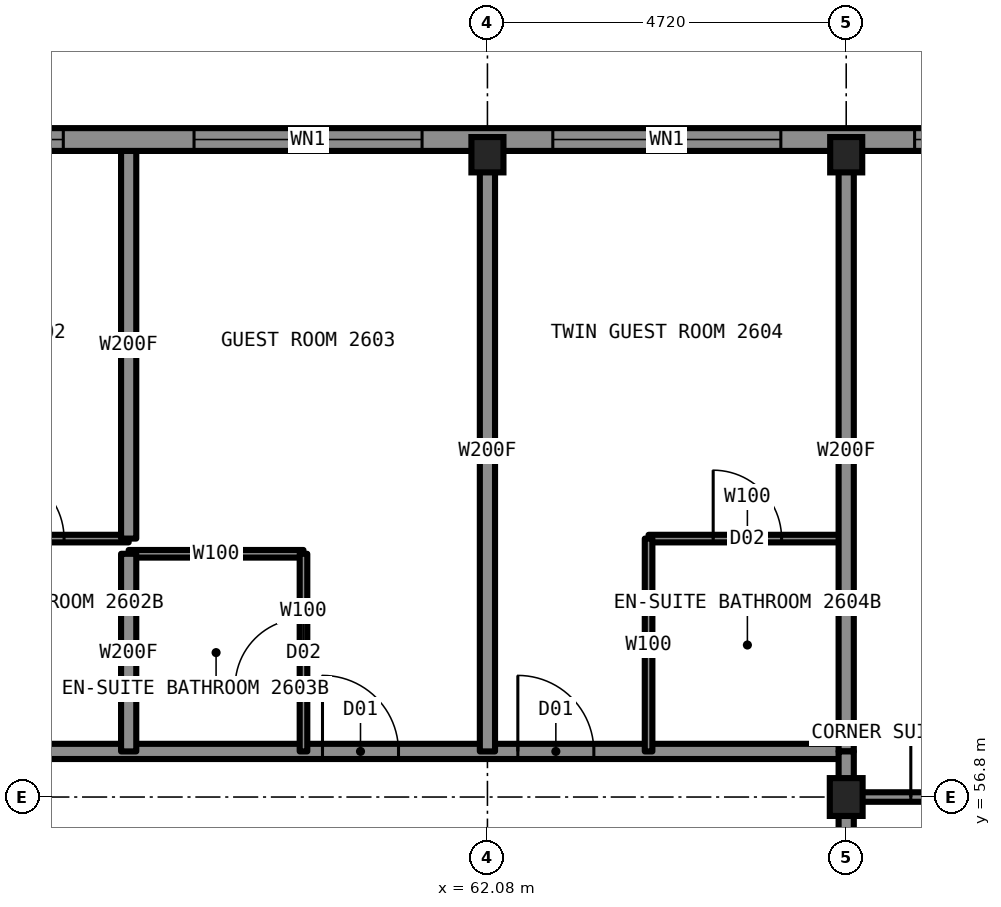
"""IFC4 building model, lengths in metres.
Left out: names, types, materials, properties, quantities, classifications, styles, units other than length and angle.
Written with IfcOpenShell. Run it as: python <this file> out.ifc"""

import sys

from ifc_helpers import new_model, si_unit, direction, frame, frame_2d, origin, origin_2d, place, context, subcontext, project, spatial, rectangle, i_section, extrude, element, fill, save


model = new_model("IFC4")
c1 = context("Model", 3, precision=1e-05, world=origin(), true_north=direction((0.0, 1.0)))
c2 = subcontext(c1, "Body", "Model", "MODEL_VIEW")
j1 = project(units=[si_unit("LENGTHUNIT", "METRE"), si_unit("PLANEANGLEUNIT", "RADIAN")], contexts=[c1])
p1 = place(None, origin())
s1 = spatial("IfcSite", under=j1, at=p1, CompositionType="ELEMENT")
p2 = place(p1, origin())
s2 = spatial("IfcBuilding", under=s1, at=p2, CompositionType="ELEMENT")
p3 = place(p2, frame((0.0, 0.0, 93.4)))
s3 = spatial("IfcBuildingStorey", under=s2, at=p3, CompositionType="ELEMENT", Elevation=93.4)
for number, where, z_axis, x_axis in (
    (1, (62.08, 65.25, 0.0), (0.0, 0.0, 1.0), (1.0, 0.0, 0.0)),
    (2, (66.8, 65.25, 0.0), (0.0, 0.0, 1.0), (1.0, 0.0, 0.0)),
):
    element("IfcColumn", number, at=place(p3, frame(where, z_axis=z_axis, x_axis=x_axis)), inside=s3, PredefinedType="COLUMN", context=c2, shape_type="SweptSolid", body=[
        extrude(i_section(OverallWidth=0.442, OverallDepth=0.531, WebThickness=0.066, FlangeThickness=0.106, at=origin_2d()), origin(), (0.0, 0.0, 1.0), 3.5),
    ])
p4 = place(p3, frame((66.8, 56.8, 0.0), z_axis=(0.0, 0.0, 1.0), x_axis=(1.0, 0.0, 0.0)))
e3 = element("IfcColumn", 3, at=p4, inside=s3, PredefinedType="COLUMN", context=c2, shape_type="SweptSolid", body=[
    extrude(i_section(OverallWidth=0.432, OverallDepth=0.498, WebThickness=0.056, FlangeThickness=0.089, at=origin_2d()), origin(), (0.0, 0.0, 1.0), 3.5),
])
p5 = place(p3, frame((66.8, 56.8, 0.0), z_axis=(0.0, 0.0, 1.0), x_axis=(1.0, 0.0, 0.0)))
e4 = element("IfcWall", 4, at=p5, inside=s3, PredefinedType="PARTITIONING", context=c2, shape_type="SweptSolid", body=[
    extrude(rectangle(XDim=8.5, YDim=0.125, at=frame_2d((4.25, 0.0))), origin(), (0.0, 0.0, 1.0), 2.573),
])
p6 = place(p5, frame((0.85, 0.0, 0.0)))
e5 = element("IfcOpeningElement", 5, at=p6, cuts=e4, PredefinedType="OPENING", context=c2, shape_type="SweptSolid", body=[
    extrude(rectangle(XDim=0.9, YDim=2.2, at=frame_2d((0.45, 1.1))), frame((0.0, 0.073, 0.0), z_axis=(0.0, -1.0, 0.0), x_axis=(1.0, 0.0, 0.0)), (0.0, 0.0, 1.0), 0.145),
])
p7 = place(p3, frame((43.2, 57.4, 0.0), z_axis=(0.0, 0.0, 1.0), x_axis=(1.0, 0.0, 0.0)))
e6 = element("IfcWall", 6, at=p7, inside=s3, PredefinedType="PARTITIONING", context=c2, shape_type="SweptSolid", body=[
    extrude(rectangle(XDim=23.6, YDim=0.2, at=frame_2d((11.8, 0.0))), origin(), (0.0, 0.0, 1.0), 3.33),
])
p8 = place(p7, frame((3.0, 0.0, 0.0)))
e7 = element("IfcOpeningElement", 7, at=p8, cuts=e6, PredefinedType="OPENING", context=c2, shape_type="SweptSolid", body=[
    extrude(rectangle(XDim=1.0, YDim=2.2, at=frame_2d((0.5, 1.1))), frame((0.0, 0.11, 0.0), z_axis=(0.0, -1.0, 0.0), x_axis=(1.0, 0.0, 0.0)), (0.0, 0.0, 1.0), 0.22),
])
p9 = place(p7, frame((9.84, 0.0, 0.0)))
e8 = element("IfcOpeningElement", 8, at=p9, cuts=e6, PredefinedType="OPENING", context=c2, shape_type="SweptSolid", body=[
    extrude(rectangle(XDim=1.0, YDim=2.2, at=frame_2d((0.5, 1.1))), frame((0.0, 0.11, 0.0), z_axis=(0.0, -1.0, 0.0), x_axis=(1.0, 0.0, 0.0)), (0.0, 0.0, 1.0), 0.22),
])
p10 = place(p7, frame((16.71, 0.0, 0.0)))
e9 = element("IfcOpeningElement", 9, at=p10, cuts=e6, PredefinedType="OPENING", context=c2, shape_type="SweptSolid", body=[
    extrude(rectangle(XDim=1.0, YDim=2.2, at=frame_2d((0.5, 1.1))), frame((0.0, 0.11, 0.0), z_axis=(0.0, -1.0, 0.0), x_axis=(1.0, 0.0, 0.0)), (0.0, 0.0, 1.0), 0.22),
])
p11 = place(p7, frame((19.28, 0.0, 0.0)))
e10 = element("IfcOpeningElement", 10, at=p11, cuts=e6, PredefinedType="OPENING", context=c2, shape_type="SweptSolid", body=[
    extrude(rectangle(XDim=1.0, YDim=2.2, at=frame_2d((0.5, 1.1))), frame((0.0, 0.11, 0.0), z_axis=(0.0, -1.0, 0.0), x_axis=(1.0, 0.0, 0.0)), (0.0, 0.0, 1.0), 0.22),
])
p12 = place(p3, frame((57.36, 60.0, 0.0), z_axis=(0.0, 0.0, 1.0), x_axis=(1.0, 0.0, 0.0)))
e11 = element("IfcWall", 11, at=p12, inside=s3, PredefinedType="PARTITIONING", context=c2, shape_type="SweptSolid", body=[
    extrude(rectangle(XDim=2.3, YDim=0.1, at=frame_2d((1.15, 0.0))), origin(), (0.0, 0.0, 1.0), 2.731),
])
p13 = place(p3, frame((54.76, 60.2, 0.0), z_axis=(0.0, 0.0, 1.0), x_axis=(1.0, 0.0, 0.0)))
e12 = element("IfcWall", 12, at=p13, inside=s3, PredefinedType="PARTITIONING", context=c2, shape_type="SweptSolid", body=[
    extrude(rectangle(XDim=2.6, YDim=0.1, at=frame_2d((1.3, 0.0))), origin(), (0.0, 0.0, 1.0), 2.731),
])
p14 = place(p13, frame((0.85, 0.0, 0.0)))
e13 = element("IfcOpeningElement", 13, at=p14, cuts=e12, PredefinedType="OPENING", context=c2, shape_type="SweptSolid", body=[
    extrude(rectangle(XDim=0.9, YDim=2.1, at=frame_2d((0.45, 1.05))), frame((0.0, 0.06, 0.0), z_axis=(0.0, -1.0, 0.0), x_axis=(1.0, 0.0, 0.0)), (0.0, 0.0, 1.0), 0.12),
])
p15 = place(p3, frame((64.2, 60.2, 0.0), z_axis=(0.0, 0.0, 1.0), x_axis=(1.0, 0.0, 0.0)))
e14 = element("IfcWall", 14, at=p15, inside=s3, PredefinedType="PARTITIONING", context=c2, shape_type="SweptSolid", body=[
    extrude(rectangle(XDim=2.6, YDim=0.1, at=frame_2d((1.3, 0.0))), origin(), (0.0, 0.0, 1.0), 2.731),
])
p16 = place(p15, frame((0.85, 0.0, 0.0)))
e15 = element("IfcOpeningElement", 15, at=p16, cuts=e14, PredefinedType="OPENING", context=c2, shape_type="SweptSolid", body=[
    extrude(rectangle(XDim=0.9, YDim=2.1, at=frame_2d((0.45, 1.05))), frame((0.0, 0.06, 0.0), z_axis=(0.0, -1.0, 0.0), x_axis=(1.0, 0.0, 0.0)), (0.0, 0.0, 1.0), 0.12),
])
p17 = place(p3, frame((66.8, 33.22, 0.0), z_axis=(0.0, 0.0, 1.0), x_axis=(0.0, 1.0, 0.0)))
e16 = element("IfcWall", 16, at=p17, inside=s3, PredefinedType="PARTITIONING", context=c2, shape_type="SweptSolid", body=[
    extrude(rectangle(XDim=23.56, YDim=0.2, at=frame_2d((11.78, 0.0))), origin(), (0.0, 0.0, 1.0), 3.33),
])
p18 = place(p17, frame((6.16, 0.0, 0.0)))
e17 = element("IfcOpeningElement", 17, at=p18, cuts=e16, PredefinedType="OPENING", context=c2, shape_type="SweptSolid", body=[
    extrude(rectangle(XDim=1.0, YDim=2.2, at=frame_2d((0.5, 1.1))), frame((0.0, 0.11, 0.0), z_axis=(0.0, -1.0, 0.0), x_axis=(1.0, 0.0, 0.0)), (0.0, 0.0, 1.0), 0.22),
])
p19 = place(p17, frame((12.42, 0.0, 0.0)))
e18 = element("IfcOpeningElement", 18, at=p19, cuts=e16, PredefinedType="OPENING", context=c2, shape_type="SweptSolid", body=[
    extrude(rectangle(XDim=1.0, YDim=2.2, at=frame_2d((0.5, 1.1))), frame((0.0, 0.11, 0.0), z_axis=(0.0, -1.0, 0.0), x_axis=(1.0, 0.0, 0.0)), (0.0, 0.0, 1.0), 0.22),
])
p20 = place(p17, frame((21.82, 0.0, 0.0)))
e19 = element("IfcOpeningElement", 19, at=p20, cuts=e16, PredefinedType="OPENING", context=c2, shape_type="SweptSolid", body=[
    extrude(rectangle(XDim=1.1, YDim=2.2, at=frame_2d((0.55, 1.1))), frame((0.0, 0.11, 0.0), z_axis=(0.0, -1.0, 0.0), x_axis=(1.0, 0.0, 0.0)), (0.0, 0.0, 1.0), 0.22),
])
p21 = place(p17, frame((0.64, 0.0, 0.0)))
e20 = element("IfcOpeningElement", 20, at=p21, cuts=e16, PredefinedType="OPENING", context=c2, shape_type="SweptSolid", body=[
    extrude(rectangle(XDim=1.1, YDim=2.2, at=frame_2d((0.55, 1.1))), frame((0.0, 0.11, 0.0), z_axis=(0.0, -1.0, 0.0), x_axis=(1.0, 0.0, 0.0)), (0.0, 0.0, 1.0), 0.22),
])
p22 = place(p3, frame((66.8, 57.4, 0.0), z_axis=(0.0, 0.0, 1.0), x_axis=(0.0, 1.0, 0.0)))
e21 = element("IfcWall", 21, at=p22, inside=s3, PredefinedType="PARTITIONING", context=c2, shape_type="SweptSolid", body=[
    extrude(rectangle(XDim=7.9, YDim=0.2, at=frame_2d((3.95, 0.0))), origin(), (0.0, 0.0, 1.0), 2.573),
])
p23 = place(p3, frame((57.36, 57.4, 0.0), z_axis=(0.0, 0.0, 1.0), x_axis=(0.0, 1.0, 0.0)))
e22 = element("IfcWall", 22, at=p23, inside=s3, PredefinedType="PARTITIONING", context=c2, shape_type="SweptSolid", body=[
    extrude(rectangle(XDim=2.6, YDim=0.2, at=frame_2d((1.3, 0.0))), origin(), (0.0, 0.0, 1.0), 3.33),
])
p24 = place(p3, frame((57.36, 60.2, 0.0), z_axis=(0.0, 0.0, 1.0), x_axis=(0.0, 1.0, 0.0)))
e23 = element("IfcWall", 23, at=p24, inside=s3, PredefinedType="PARTITIONING", context=c2, shape_type="SweptSolid", body=[
    extrude(rectangle(XDim=5.1, YDim=0.2, at=frame_2d((2.55, 0.0))), origin(), (0.0, 0.0, 1.0), 3.33),
])
p25 = place(p3, frame((59.66, 57.4, 0.0), z_axis=(0.0, 0.0, 1.0), x_axis=(0.0, 1.0, 0.0)))
e24 = element("IfcWall", 24, at=p25, inside=s3, PredefinedType="PARTITIONING", context=c2, shape_type="SweptSolid", body=[
    extrude(rectangle(XDim=2.6, YDim=0.1, at=frame_2d((1.3, 0.0))), origin(), (0.0, 0.0, 1.0), 3.33),
])
p26 = place(p25, frame((0.85, 0.0, 0.0)))
e25 = element("IfcOpeningElement", 25, at=p26, cuts=e24, PredefinedType="OPENING", context=c2, shape_type="SweptSolid", body=[
    extrude(rectangle(XDim=0.9, YDim=2.1, at=frame_2d((0.45, 1.05))), frame((0.0, 0.06, 0.0), z_axis=(0.0, -1.0, 0.0), x_axis=(1.0, 0.0, 0.0)), (0.0, 0.0, 1.0), 0.12),
])
p27 = place(p3, frame((62.08, 57.4, 0.0), z_axis=(0.0, 0.0, 1.0), x_axis=(0.0, 1.0, 0.0)))
e26 = element("IfcWall", 26, at=p27, inside=s3, PredefinedType="PARTITIONING", context=c2, shape_type="SweptSolid", body=[
    extrude(rectangle(XDim=7.9, YDim=0.2, at=frame_2d((3.95, 0.0))), origin(), (0.0, 0.0, 1.0), 2.573),
])
p28 = place(p3, frame((64.2, 57.4, 0.0), z_axis=(0.0, 0.0, 1.0), x_axis=(0.0, 1.0, 0.0)))
e27 = element("IfcWall", 27, at=p28, inside=s3, PredefinedType="PARTITIONING", context=c2, shape_type="SweptSolid", body=[
    extrude(rectangle(XDim=2.8, YDim=0.1, at=frame_2d((1.4, 0.0))), origin(), (0.0, 0.0, 1.0), 3.33),
])
p29 = place(p3, frame((70.1, 65.45, 0.0), z_axis=(0.0, 0.0, 1.0), x_axis=(-1.0, 0.0, 0.0)))
e28 = element("IfcWall", 28, at=p29, inside=s3, PredefinedType="SOLIDWALL", context=c2, shape_type="SweptSolid", body=[
    extrude(rectangle(XDim=30.2, YDim=0.3, at=frame_2d((15.1, 0.0))), origin(), (0.0, 0.0, 1.0), 2.83),
])
p30 = place(p29, frame((0.85, 0.0, 0.5)))
e29 = element("IfcOpeningElement", 29, at=p30, cuts=e28, PredefinedType="OPENING", context=c2, shape_type="SweptSolid", body=[
    extrude(rectangle(XDim=1.6, YDim=2.0, at=frame_2d((0.8, 1.0))), frame((0.0, 0.16, 0.0), z_axis=(0.0, -1.0, 0.0), x_axis=(1.0, 0.0, 0.0)), (0.0, 0.0, 1.0), 0.32),
])
p31 = place(p29, frame((4.16, 0.0, 0.5)))
e30 = element("IfcOpeningElement", 30, at=p31, cuts=e28, PredefinedType="OPENING", context=c2, shape_type="SweptSolid", body=[
    extrude(rectangle(XDim=3.0, YDim=2.0, at=frame_2d((1.5, 1.0))), frame((0.0, 0.16, 0.0), z_axis=(0.0, -1.0, 0.0), x_axis=(1.0, 0.0, 0.0)), (0.0, 0.0, 1.0), 0.32),
])
p32 = place(p29, frame((8.88, 0.0, 0.5)))
e31 = element("IfcOpeningElement", 31, at=p32, cuts=e28, PredefinedType="OPENING", context=c2, shape_type="SweptSolid", body=[
    extrude(rectangle(XDim=3.0, YDim=2.0, at=frame_2d((1.5, 1.0))), frame((0.0, 0.16, 0.0), z_axis=(0.0, -1.0, 0.0), x_axis=(1.0, 0.0, 0.0)), (0.0, 0.0, 1.0), 0.32),
])
p33 = place(p29, frame((13.6, 0.0, 0.5)))
e32 = element("IfcOpeningElement", 32, at=p33, cuts=e28, PredefinedType="OPENING", context=c2, shape_type="SweptSolid", body=[
    extrude(rectangle(XDim=3.0, YDim=2.0, at=frame_2d((1.5, 1.0))), frame((0.0, 0.16, 0.0), z_axis=(0.0, -1.0, 0.0), x_axis=(1.0, 0.0, 0.0)), (0.0, 0.0, 1.0), 0.32),
])
p34 = place(p29, frame((18.32, 0.0, 0.5)))
e33 = element("IfcOpeningElement", 33, at=p34, cuts=e28, PredefinedType="OPENING", context=c2, shape_type="SweptSolid", body=[
    extrude(rectangle(XDim=3.0, YDim=2.0, at=frame_2d((1.5, 1.0))), frame((0.0, 0.16, 0.0), z_axis=(0.0, -1.0, 0.0), x_axis=(1.0, 0.0, 0.0)), (0.0, 0.0, 1.0), 0.32),
])
p35 = place(p29, frame((23.04, 0.0, 0.5)))
e34 = element("IfcOpeningElement", 34, at=p35, cuts=e28, PredefinedType="OPENING", context=c2, shape_type="SweptSolid", body=[
    extrude(rectangle(XDim=3.0, YDim=2.0, at=frame_2d((1.5, 1.0))), frame((0.0, 0.16, 0.0), z_axis=(0.0, -1.0, 0.0), x_axis=(1.0, 0.0, 0.0)), (0.0, 0.0, 1.0), 0.32),
])
p36 = place(p29, frame((27.75, 0.0, 0.5)))
e35 = element("IfcOpeningElement", 35, at=p36, cuts=e28, PredefinedType="OPENING", context=c2, shape_type="SweptSolid", body=[
    extrude(rectangle(XDim=1.6, YDim=2.0, at=frame_2d((0.8, 1.0))), frame((0.0, 0.16, 0.0), z_axis=(0.0, -1.0, 0.0), x_axis=(1.0, 0.0, 0.0)), (0.0, 0.0, 1.0), 0.32),
])
p37 = place(p3, frame((66.8, 56.78, 0.0), z_axis=(0.0, 0.0, 1.0), x_axis=(0.0, 1.0, 0.0)))
e36 = element("IfcWall", 36, at=p37, inside=s3, PredefinedType="PARTITIONING", context=c2, shape_type="SweptSolid", body=[
    extrude(rectangle(XDim=0.62, YDim=0.2, at=frame_2d((0.31, 0.0))), origin(), (0.0, 0.0, 1.0), 2.573),
])
p38 = place(p14, origin())
e37 = element("IfcDoor", 37, at=p38, inside=s3, OperationType="SINGLE_SWING_RIGHT", PredefinedType="DOOR", context=c2, shape_type="SweptSolid", body=[
    extrude(rectangle(XDim=0.9, YDim=2.1, at=frame_2d((0.45, 1.05))), frame((0.0, 0.025, 0.0), z_axis=(0.0, -1.0, 0.0), x_axis=(1.0, 0.0, 0.0)), (0.0, 0.0, 1.0), 0.05),
])
fill(e13, e37)
p39 = place(p10, origin())
e38 = element("IfcDoor", 38, at=p39, inside=s3, OperationType="SINGLE_SWING_LEFT", PredefinedType="DOOR", context=c2, shape_type="SweptSolid", body=[
    extrude(rectangle(XDim=1.0, YDim=2.2, at=frame_2d((0.5, 1.1))), frame((0.0, 0.025, 0.0), z_axis=(0.0, -1.0, 0.0), x_axis=(1.0, 0.0, 0.0)), (0.0, 0.0, 1.0), 0.05),
])
fill(e9, e38)
p40 = place(p26, origin())
e39 = element("IfcDoor", 39, at=p40, inside=s3, OperationType="SINGLE_SWING_RIGHT", PredefinedType="DOOR", context=c2, shape_type="SweptSolid", body=[
    extrude(rectangle(XDim=0.9, YDim=2.1, at=frame_2d((0.45, 1.05))), frame((0.0, 0.025, 0.0), z_axis=(0.0, -1.0, 0.0), x_axis=(1.0, 0.0, 0.0)), (0.0, 0.0, 1.0), 0.05),
])
fill(e25, e39)
p41 = place(p11, origin())
e40 = element("IfcDoor", 40, at=p41, inside=s3, OperationType="SINGLE_SWING_LEFT", PredefinedType="DOOR", context=c2, shape_type="SweptSolid", body=[
    extrude(rectangle(XDim=1.0, YDim=2.2, at=frame_2d((0.5, 1.1))), frame((0.0, 0.025, 0.0), z_axis=(0.0, -1.0, 0.0), x_axis=(1.0, 0.0, 0.0)), (0.0, 0.0, 1.0), 0.05),
])
fill(e10, e40)
p42 = place(p16, origin())
e41 = element("IfcDoor", 41, at=p42, inside=s3, OperationType="SINGLE_SWING_RIGHT", PredefinedType="DOOR", context=c2, shape_type="SweptSolid", body=[
    extrude(rectangle(XDim=0.9, YDim=2.1, at=frame_2d((0.45, 1.05))), frame((0.0, 0.025, 0.0), z_axis=(0.0, -1.0, 0.0), x_axis=(1.0, 0.0, 0.0)), (0.0, 0.0, 1.0), 0.05),
])
fill(e15, e41)
p43 = place(p6, origin())
e42 = element("IfcDoor", 42, at=p43, inside=s3, OperationType="SINGLE_SWING_LEFT", PredefinedType="DOOR", context=c2, shape_type="SweptSolid", body=[
    extrude(rectangle(XDim=0.9, YDim=2.2, at=frame_2d((0.45, 1.1))), frame((0.0, 0.025, 0.0), z_axis=(0.0, -1.0, 0.0), x_axis=(1.0, 0.0, 0.0)), (0.0, 0.0, 1.0), 0.05),
])
fill(e5, e42)
p44 = place(p30, origin())
e43 = element("IfcWindow", 43, at=p44, inside=s3, PartitioningType="SINGLE_PANEL", PredefinedType="WINDOW", context=c2, shape_type="SweptSolid", body=[
    extrude(rectangle(XDim=1.6, YDim=2.0, at=frame_2d((0.8, 1.0))), frame((0.0, 0.03, 0.0), z_axis=(0.0, -1.0, 0.0), x_axis=(1.0, 0.0, 0.0)), (0.0, 0.0, 1.0), 0.06),
])
fill(e29, e43)
p45 = place(p31, origin())
e44 = element("IfcWindow", 44, at=p45, inside=s3, PartitioningType="SINGLE_PANEL", PredefinedType="WINDOW", context=c2, shape_type="SweptSolid", body=[
    extrude(rectangle(XDim=3.0, YDim=2.0, at=frame_2d((1.5, 1.0))), frame((0.0, 0.03, 0.0), z_axis=(0.0, -1.0, 0.0), x_axis=(1.0, 0.0, 0.0)), (0.0, 0.0, 1.0), 0.06),
])
fill(e30, e44)
p46 = place(p32, origin())
e45 = element("IfcWindow", 45, at=p46, inside=s3, PartitioningType="SINGLE_PANEL", PredefinedType="WINDOW", context=c2, shape_type="SweptSolid", body=[
    extrude(rectangle(XDim=3.0, YDim=2.0, at=frame_2d((1.5, 1.0))), frame((0.0, 0.03, 0.0), z_axis=(0.0, -1.0, 0.0), x_axis=(1.0, 0.0, 0.0)), (0.0, 0.0, 1.0), 0.06),
])
fill(e31, e45)
p47 = place(p33, origin())
e46 = element("IfcWindow", 46, at=p47, inside=s3, PartitioningType="SINGLE_PANEL", PredefinedType="WINDOW", context=c2, shape_type="SweptSolid", body=[
    extrude(rectangle(XDim=3.0, YDim=2.0, at=frame_2d((1.5, 1.0))), frame((0.0, 0.03, 0.0), z_axis=(0.0, -1.0, 0.0), x_axis=(1.0, 0.0, 0.0)), (0.0, 0.0, 1.0), 0.06),
])
fill(e32, e46)
save(model, sys.argv[1])
